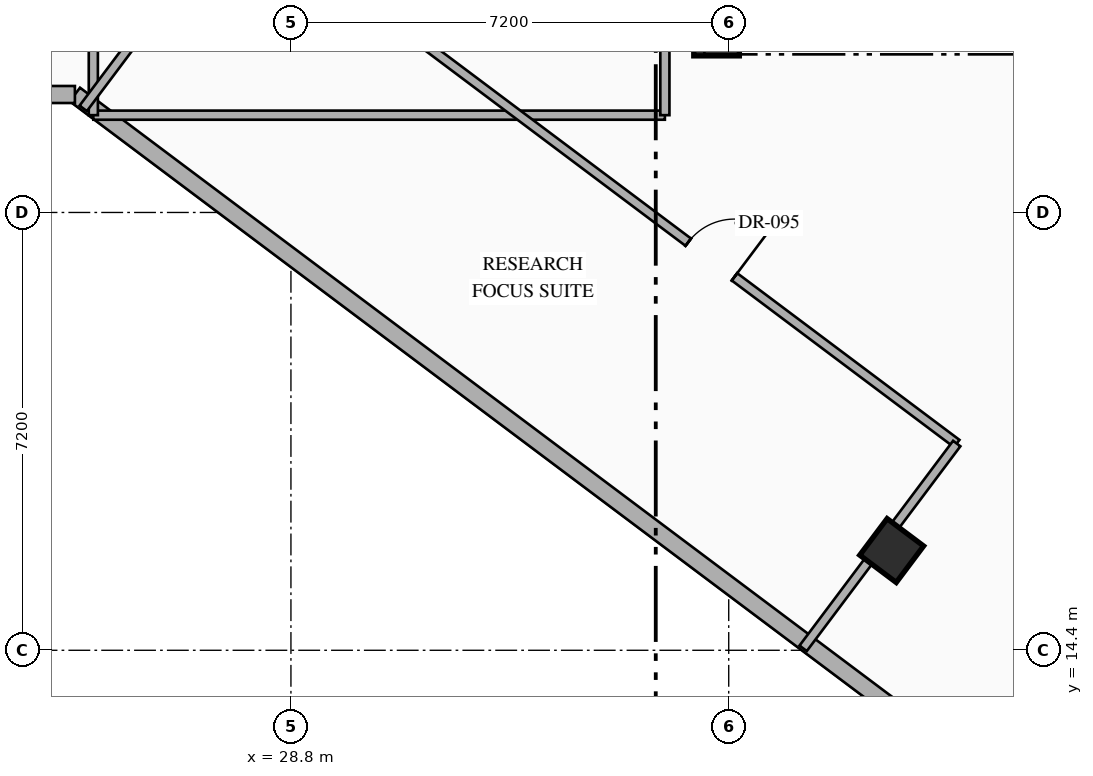
"""IFC4 building model, lengths in metres.
Left out: names, types, materials, properties, quantities, classifications, styles, units other than length and angle.
Written with IfcOpenShell. Run it as: python <this file> out.ifc"""

import sys

from ifc_helpers import new_model, si_unit, direction, frame, frame_2d, origin, origin_2d, place, context, subcontext, project, spatial, rectangle, hollow_rectangle, extrude, element, fill, save


model = new_model("IFC4")
c1 = context("Model", 3, precision=1e-05, world=origin(), true_north=direction((0.0, 1.0)))
c2 = subcontext(c1, "Body", "Model", "MODEL_VIEW")
j1 = project(units=[si_unit("LENGTHUNIT", "METRE"), si_unit("PLANEANGLEUNIT", "RADIAN")], contexts=[c1])
p1 = place(None, origin())
s1 = spatial("IfcSite", under=j1, at=p1, CompositionType="ELEMENT")
p2 = place(p1, origin())
s2 = spatial("IfcBuilding", under=s1, at=p2, CompositionType="ELEMENT")
p3 = place(p2, frame((0.0, 0.0, 191.55)))
s3 = spatial("IfcBuildingStorey", under=s2, at=p3, CompositionType="ELEMENT", Elevation=191.55)
for number, where, z_axis, x_axis in (
    (1, (35.8, 24.55, 0.0), (0.0, 0.0, 1.0), (1.0, 0.0, 0.0)),
    (2, (38.68, 16.04, 0.0), (0.0, 0.0, 1.0), (0.8, -0.6, 0.0)),
):
    element("IfcColumn", number, at=place(p3, frame(where, z_axis=z_axis, x_axis=x_axis)), inside=s3, PredefinedType="COLUMN", context=c2, shape_type="SweptSolid", body=[
        extrude(hollow_rectangle(XDim=0.75, YDim=0.75, WallThickness=0.028, at=origin_2d()), origin(), (0.0, 0.0, 1.0), 3.6),
    ])
p4 = place(p3, frame((44.918, 8.787, 0.0), z_axis=(0.0, 0.0, 1.0), x_axis=(-0.800004765927, 0.599993645378, 0.0)))
e3 = element("IfcWall", 3, at=p4, inside=s3, PredefinedType="STANDARD", context=c2, shape_type="SweptSolid", body=[
    extrude(rectangle(XDim=24.588, YDim=0.28, at=frame_2d((12.294, 0.0))), origin(), (0.0, 0.0, 1.0), 3.35),
])
p5 = place(p3, frame((25.247, 23.54, 0.0), z_axis=(0.0, 0.0, 1.0), x_axis=(-1.0, 0.0, 0.0)))
e4 = element("IfcWall", 4, at=p5, inside=s3, PredefinedType="STANDARD", context=c2, shape_type="SweptSolid", body=[
    extrude(rectangle(XDim=4.789, YDim=0.28, at=frame_2d((2.395, 0.0))), origin(), (0.0, 0.0, 1.0), 3.35),
])
p6 = place(p3, frame((25.55, 23.2, 0.0), z_axis=(0.0, 0.0, 1.0), x_axis=(1.0, 0.0, 0.0)))
e5 = element("IfcWall", 5, at=p6, inside=s3, PredefinedType="PARTITIONING", context=c2, shape_type="SweptSolid", body=[
    extrude(rectangle(XDim=9.4, YDim=0.15, at=frame_2d((4.7, 0.0))), origin(), (0.0, 0.0, 1.0), 3.35),
])
p7 = place(p3, frame((25.55, 23.2, 0.0), z_axis=(0.0, 0.0, 1.0), x_axis=(0.0, 1.0, 0.0)))
e6 = element("IfcWall", 6, at=p7, inside=s3, PredefinedType="PARTITIONING", context=c2, shape_type="SweptSolid", body=[
    extrude(rectangle(XDim=7.15, YDim=0.15, at=frame_2d((3.575, 0.0))), origin(), (0.0, 0.0, 1.0), 2.757),
])
p8 = place(p3, frame((34.95, 23.2, 0.0), z_axis=(0.0, 0.0, 1.0), x_axis=(0.0, 1.0, 0.0)))
e7 = element("IfcWall", 7, at=p8, inside=s3, PredefinedType="PARTITIONING", context=c2, shape_type="SweptSolid", body=[
    extrude(rectangle(XDim=7.15, YDim=0.15, at=frame_2d((3.575, 0.0))), origin(), (0.0, 0.0, 1.0), 3.35),
])
p9 = place(p3, frame((27.91, 26.68, 0.0), z_axis=(0.0, 0.0, 1.0), x_axis=(0.800005938517, -0.599992081896, 0.0)))
e8 = element("IfcWall", 8, at=p9, inside=s3, PredefinedType="PARTITIONING", context=c2, shape_type="SweptSolid", body=[
    extrude(rectangle(XDim=14.8, YDim=0.15, at=frame_2d((7.4, 0.0))), origin(), (0.0, 0.0, 1.0), 3.35),
])
p10 = place(p9, frame((9.281, 0.0, 0.0)))
e9 = element("IfcOpeningElement", 9, at=p10, cuts=e8, PredefinedType="OPENING", context=c2, shape_type="SweptSolid", body=[
    extrude(rectangle(XDim=0.95, YDim=2.15, at=frame_2d((0.475, 1.075))), frame((0.0, 0.085, 0.0), z_axis=(0.0, -1.0, 0.0), x_axis=(1.0, 0.0, 0.0)), (0.0, 0.0, 1.0), 0.17),
])
p11 = place(p3, frame((25.384, 23.312, 0.0), z_axis=(0.0, 0.0, 1.0), x_axis=(0.599990721155, 0.80000695905, 0.0)))
e10 = element("IfcWall", 10, at=p11, inside=s3, PredefinedType="PARTITIONING", context=c2, shape_type="SweptSolid", body=[
    extrude(rectangle(XDim=4.21, YDim=0.15, at=frame_2d((2.105, 0.0))), origin(), (0.0, 0.0, 1.0), 3.35),
])
p12 = place(p3, frame((37.224, 14.432, 0.0), z_axis=(0.0, 0.0, 1.0), x_axis=(0.599962885857, 0.800027834262, 0.0)))
e11 = element("IfcWall", 11, at=p12, inside=s3, PredefinedType="PARTITIONING", context=c2, shape_type="SweptSolid", body=[
    extrude(rectangle(XDim=4.21, YDim=0.15, at=frame_2d((2.105, 0.0))), origin(), (0.0, 0.0, 1.0), 2.757),
])
p13 = place(p10, origin())
e12 = element("IfcDoor", 12, at=p13, inside=s3, OperationType="SINGLE_SWING_RIGHT", PredefinedType="DOOR", context=c2, shape_type="SweptSolid", body=[
    extrude(rectangle(XDim=0.95, YDim=2.15, at=frame_2d((0.475, 1.075))), frame((0.0, 0.025, 0.0), z_axis=(0.0, -1.0, 0.0), x_axis=(1.0, 0.0, 0.0)), (0.0, 0.0, 1.0), 0.05),
])
fill(e9, e12)
save(model, sys.argv[1])
